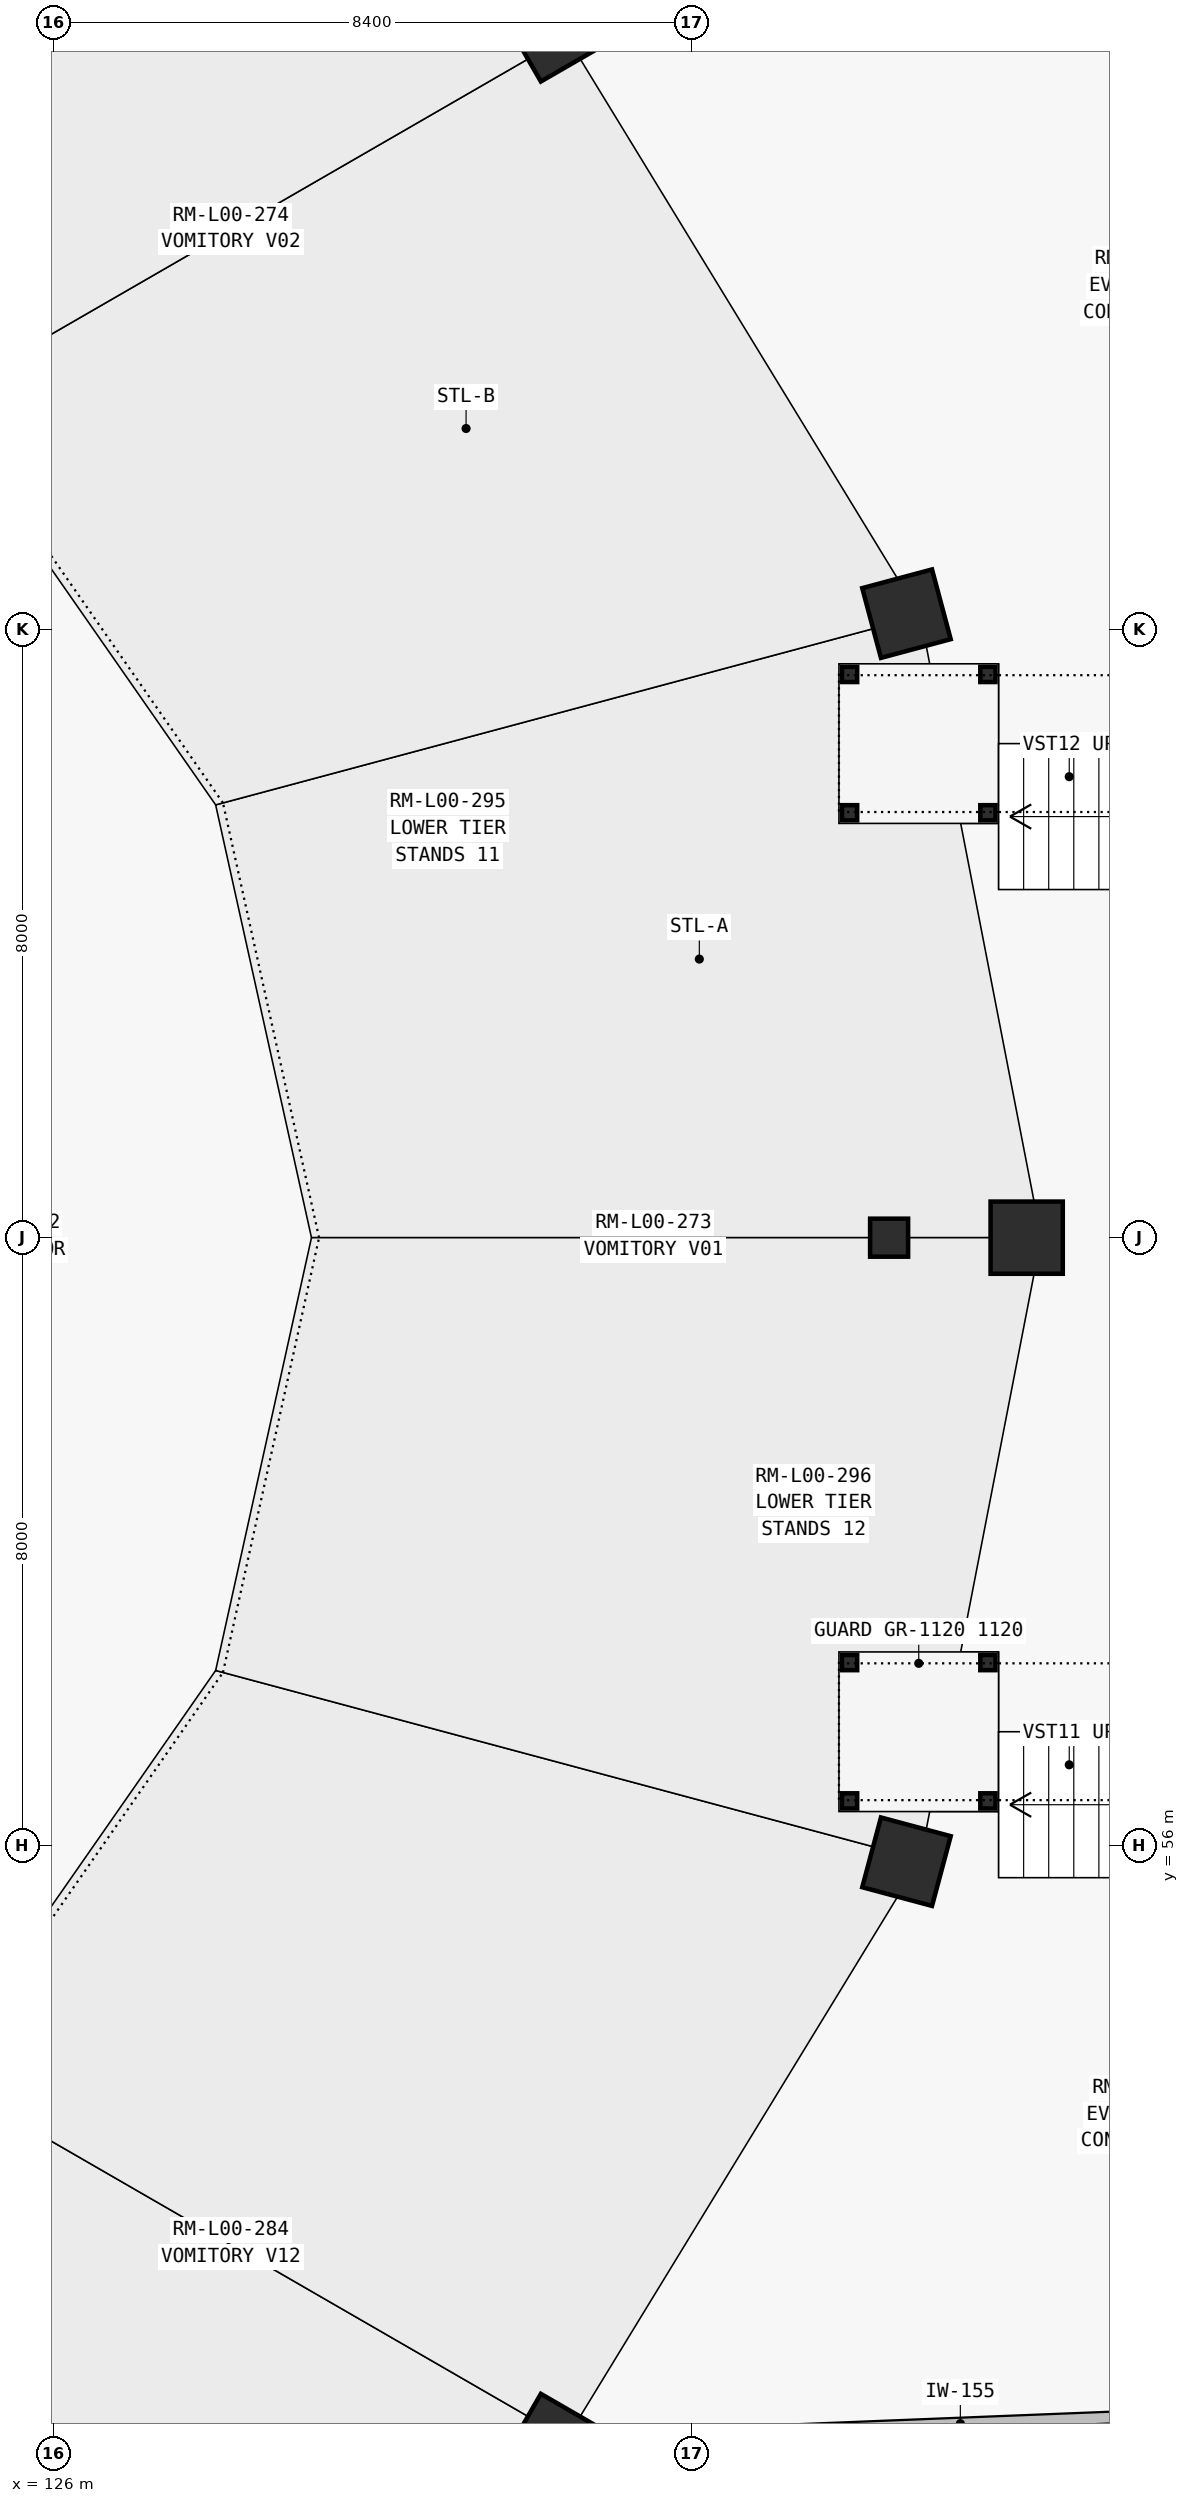
"""IFC4 building model, lengths in metres.
Left out: names, types, materials, properties, quantities, classifications, styles, units other than length and angle.
Written with IfcOpenShell. Run it as: python <this file> out.ifc"""

import sys

from ifc_helpers import new_model, si_unit, direction, frame, frame_2d, origin, origin_2d, place, context, subcontext, project, spatial, rectangle, hollow_rectangle, i_section, extrude, element, save


model = new_model("IFC4")
c1 = context("Model", 3, precision=1e-05, world=origin(), true_north=direction((0.0, 1.0)))
c2 = subcontext(c1, "Body", "Model", "MODEL_VIEW")
j1 = project(units=[si_unit("LENGTHUNIT", "METRE"), si_unit("PLANEANGLEUNIT", "RADIAN")], contexts=[c1])
p1 = place(None, origin())
s1 = spatial("IfcSite", under=j1, at=p1, CompositionType="ELEMENT")
p2 = place(p1, origin())
s2 = spatial("IfcBuilding", under=s1, at=p2, CompositionType="ELEMENT")
p3 = place(p2, origin())
s3 = spatial("IfcBuildingStorey", under=s2, at=p3, CompositionType="ELEMENT", Elevation=0.0)
for number, where, z_axis, x_axis in (
    (1, (138.81, 64.0, 0.0), (0.0, 0.0, 1.0), (1.0, 0.0, 0.0)),
    (2, (137.229, 72.21, 0.0), (0.0, 0.0, 1.0), (0.966, 0.259, 0.0)),
    (3, (132.592, 79.86, 0.0), (0.0, 0.0, 1.0), (0.866, 0.5, 0.0)),
    (4, (132.592, 48.14, 0.0), (0.0, 0.0, 1.0), (0.866, -0.5, 0.0)),
    (5, (137.229, 55.79, 0.0), (0.0, 0.0, 1.0), (0.966, -0.259, 0.0)),
):
    element("IfcColumn", number, at=place(p3, frame(where, z_axis=z_axis, x_axis=x_axis)), inside=s3, PredefinedType="COLUMN", context=c2, shape_type="SweptSolid", body=[
        extrude(rectangle(XDim=0.95, YDim=0.95, at=origin_2d()), origin(), (0.0, 0.0, 1.0), 5.4),
    ])
p4 = place(p3, frame((137.0, 64.0, 0.0), z_axis=(0.0, 0.0, 1.0), x_axis=(1.0, 0.0, 0.0)))
e6 = element("IfcColumn", 6, at=p4, inside=s3, PredefinedType="COLUMN", context=c2, shape_type="SweptSolid", body=[
    extrude(i_section(OverallWidth=0.5, OverallDepth=0.5, WebThickness=0.025, FlangeThickness=0.042, at=origin_2d()), origin(), (0.0, 0.0, 1.0), 5.4),
])
for number, where, z_axis, x_axis in (
    (7, (136.48, 56.59, 0.0), (0.0, 0.0, 1.0), (1.0, 0.0, 0.0)),
    (8, (138.3, 56.59, 0.0), (0.0, 0.0, 1.0), (1.0, 0.0, 0.0)),
    (9, (136.48, 58.41, 0.0), (0.0, 0.0, 1.0), (1.0, 0.0, 0.0)),
    (10, (138.3, 58.41, 0.0), (0.0, 0.0, 1.0), (1.0, 0.0, 0.0)),
    (11, (136.48, 69.59, 0.0), (0.0, 0.0, 1.0), (1.0, 0.0, 0.0)),
    (12, (138.3, 69.59, 0.0), (0.0, 0.0, 1.0), (1.0, 0.0, 0.0)),
    (13, (136.48, 71.41, 0.0), (0.0, 0.0, 1.0), (1.0, 0.0, 0.0)),
    (14, (138.3, 71.41, 0.0), (0.0, 0.0, 1.0), (1.0, 0.0, 0.0)),
):
    element("IfcColumn", number, at=place(p3, frame(where, z_axis=z_axis, x_axis=x_axis)), inside=s3, PredefinedType="COLUMN", context=c2, shape_type="SweptSolid", body=[
        extrude(hollow_rectangle(XDim=0.2, YDim=0.2, WallThickness=0.009, at=origin_2d()), origin(), (0.0, 0.0, 1.0), 1.73),
    ])
p5 = place(p3, frame((132.955, 48.199, 0.0), z_axis=(0.0, 0.0, 1.0), x_axis=(0.999205605293, 0.039851704486, 0.0)))
e15 = element("IfcWall", 15, at=p5, inside=s3, PredefinedType="PARTITIONING", context=c2, shape_type="SweptSolid", body=[
    extrude(rectangle(XDim=9.973, YDim=0.155, at=frame_2d((4.987, 0.0))), origin(), (0.0, 0.0, 1.0), 5.12),
])
save(model, sys.argv[1])
